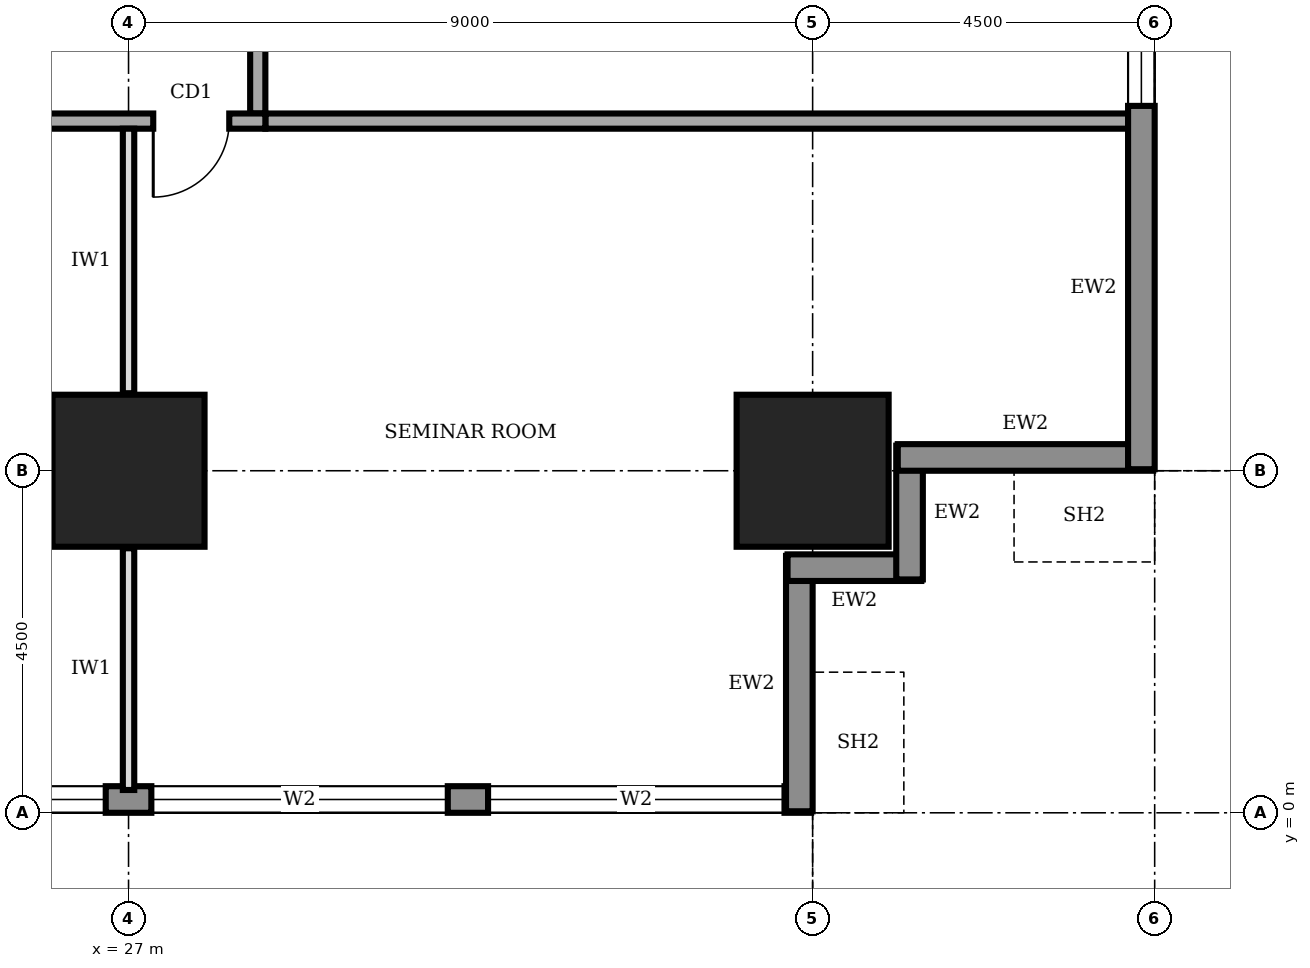
"""IFC4 building model, lengths in metres.
Left out: names, types, materials, properties, quantities, classifications, styles, units other than length and angle.
Written with IfcOpenShell. Run it as: python <this file> out.ifc"""

import sys

from ifc_helpers import new_model, si_unit, direction, frame, frame_2d, origin, origin_2d, place, context, subcontext, project, spatial, rectangle, extrude, element, fill, save


model = new_model("IFC4")
c1 = context("Model", 3, precision=1e-05, world=origin(), true_north=direction((0.0, 1.0)))
c2 = subcontext(c1, "Body", "Model", "MODEL_VIEW")
j1 = project(units=[si_unit("LENGTHUNIT", "METRE"), si_unit("PLANEANGLEUNIT", "RADIAN")], contexts=[c1])
p1 = place(None, origin())
s1 = spatial("IfcSite", under=j1, at=p1, CompositionType="ELEMENT")
p2 = place(p1, origin())
s2 = spatial("IfcBuilding", under=s1, at=p2, CompositionType="ELEMENT")
p3 = place(p2, frame((0.0, 0.0, 49.0)))
s3 = spatial("IfcBuildingStorey", under=s2, at=p3, CompositionType="ELEMENT", Elevation=49.0)
for number, where, z_axis, x_axis in (
    (1, (27.0, 4.5, 0.0), (0.0, 0.0, 1.0), (1.0, 0.0, 0.0)),
    (2, (36.0, 4.5, 0.0), (0.0, 0.0, 1.0), (1.0, 0.0, 0.0)),
):
    element("IfcColumn", number, at=place(p3, frame(where, z_axis=z_axis, x_axis=x_axis)), inside=s3, PredefinedType="COLUMN", context=c2, shape_type="SweptSolid", body=[
        extrude(rectangle(XDim=2.0, YDim=2.0, at=origin_2d()), origin(), (0.0, 0.0, 1.0), 4.0),
    ])
p4 = place(p3, frame((4.52, 0.175, 0.0), z_axis=(0.0, 0.0, 1.0), x_axis=(1.0, 0.0, 0.0)))
e3 = element("IfcWall", 3, at=p4, inside=s3, PredefinedType="STANDARD", context=c2, shape_type="SweptSolid", body=[
    extrude(rectangle(XDim=31.46, YDim=0.35, at=frame_2d((15.73, 0.0))), origin(), (0.0, 0.0, 1.0), 3.75),
])
p5 = place(p4, frame((4.78, 0.0, 0.6)))
e4 = element("IfcOpeningElement", 4, at=p5, cuts=e3, PredefinedType="OPENING", context=c2, shape_type="SweptSolid", body=[
    extrude(rectangle(XDim=3.9, YDim=2.6, at=frame_2d((1.95, 1.3))), frame((0.0, 0.185, 0.0), z_axis=(0.0, -1.0, 0.0), x_axis=(1.0, 0.0, 0.0)), (0.0, 0.0, 1.0), 0.37),
])
p6 = place(p4, frame((9.28, 0.0, 0.6)))
e5 = element("IfcOpeningElement", 5, at=p6, cuts=e3, PredefinedType="OPENING", context=c2, shape_type="SweptSolid", body=[
    extrude(rectangle(XDim=3.9, YDim=2.6, at=frame_2d((1.95, 1.3))), frame((0.0, 0.185, 0.0), z_axis=(0.0, -1.0, 0.0), x_axis=(1.0, 0.0, 0.0)), (0.0, 0.0, 1.0), 0.37),
])
p7 = place(p4, frame((13.78, 0.0, 0.6)))
e6 = element("IfcOpeningElement", 6, at=p7, cuts=e3, PredefinedType="OPENING", context=c2, shape_type="SweptSolid", body=[
    extrude(rectangle(XDim=3.9, YDim=2.6, at=frame_2d((1.95, 1.3))), frame((0.0, 0.185, 0.0), z_axis=(0.0, -1.0, 0.0), x_axis=(1.0, 0.0, 0.0)), (0.0, 0.0, 1.0), 0.37),
])
p8 = place(p4, frame((18.28, 0.0, 0.6)))
e7 = element("IfcOpeningElement", 7, at=p8, cuts=e3, PredefinedType="OPENING", context=c2, shape_type="SweptSolid", body=[
    extrude(rectangle(XDim=3.9, YDim=2.6, at=frame_2d((1.95, 1.3))), frame((0.0, 0.185, 0.0), z_axis=(0.0, -1.0, 0.0), x_axis=(1.0, 0.0, 0.0)), (0.0, 0.0, 1.0), 0.37),
])
p9 = place(p4, frame((22.78, 0.0, 0.6)))
e8 = element("IfcOpeningElement", 8, at=p9, cuts=e3, PredefinedType="OPENING", context=c2, shape_type="SweptSolid", body=[
    extrude(rectangle(XDim=3.9, YDim=2.6, at=frame_2d((1.95, 1.3))), frame((0.0, 0.185, 0.0), z_axis=(0.0, -1.0, 0.0), x_axis=(1.0, 0.0, 0.0)), (0.0, 0.0, 1.0), 0.37),
])
p10 = place(p4, frame((27.21, 0.0, 0.6)))
e9 = element("IfcOpeningElement", 9, at=p10, cuts=e3, PredefinedType="OPENING", context=c2, shape_type="SweptSolid", body=[
    extrude(rectangle(XDim=3.9, YDim=2.6, at=frame_2d((1.95, 1.3))), frame((0.0, 0.185, 0.0), z_axis=(0.0, -1.0, 0.0), x_axis=(1.0, 0.0, 0.0)), (0.0, 0.0, 1.0), 0.37),
])
p11 = place(p3, frame((35.825, 0.02, 0.0), z_axis=(0.0, 0.0, 1.0), x_axis=(0.0, 1.0, 0.0)))
e10 = element("IfcWall", 10, at=p11, inside=s3, PredefinedType="STANDARD", context=c2, shape_type="SweptSolid", body=[
    extrude(rectangle(XDim=3.36, YDim=0.35, at=frame_2d((1.68, 0.0))), origin(), (0.0, 0.0, 1.0), 2.85),
])
for number, where, z_axis, x_axis in (
    (11, (35.67, 3.225, 0.0), (0.0, 0.0, 1.0), (1.0, 0.0, 0.0)),
    (12, (37.275, 3.07, 0.0), (0.0, 0.0, 1.0), (0.0, 1.0, 0.0)),
):
    element("IfcWall", number, at=place(p3, frame(where, z_axis=z_axis, x_axis=x_axis)), inside=s3, PredefinedType="STANDARD", context=c2, shape_type="SweptSolid", body=[
        extrude(rectangle(XDim=1.76, YDim=0.35, at=frame_2d((0.88, 0.0))), origin(), (0.0, 0.0, 1.0), 3.75),
    ])
p12 = place(p3, frame((37.12, 4.675, 0.0), z_axis=(0.0, 0.0, 1.0), x_axis=(1.0, 0.0, 0.0)))
e13 = element("IfcWall", 13, at=p12, inside=s3, PredefinedType="STANDARD", context=c2, shape_type="SweptSolid", body=[
    extrude(rectangle(XDim=3.36, YDim=0.35, at=frame_2d((1.68, 0.0))), origin(), (0.0, 0.0, 1.0), 2.85),
])
p13 = place(p3, frame((40.325, 4.52, 0.0), z_axis=(0.0, 0.0, 1.0), x_axis=(0.0, 1.0, 0.0)))
e14 = element("IfcWall", 14, at=p13, inside=s3, PredefinedType="STANDARD", context=c2, shape_type="SweptSolid", body=[
    extrude(rectangle(XDim=31.46, YDim=0.35, at=frame_2d((15.73, 0.0))), origin(), (0.0, 0.0, 1.0), 3.75),
])
p14 = place(p13, frame((4.78, 0.0, 0.6)))
e15 = element("IfcOpeningElement", 15, at=p14, cuts=e14, PredefinedType="OPENING", context=c2, shape_type="SweptSolid", body=[
    extrude(rectangle(XDim=3.9, YDim=2.6, at=frame_2d((1.95, 1.3))), frame((0.0, 0.185, 0.0), z_axis=(0.0, -1.0, 0.0), x_axis=(1.0, 0.0, 0.0)), (0.0, 0.0, 1.0), 0.37),
])
p15 = place(p13, frame((9.28, 0.0, 0.6)))
e16 = element("IfcOpeningElement", 16, at=p15, cuts=e14, PredefinedType="OPENING", context=c2, shape_type="SweptSolid", body=[
    extrude(rectangle(XDim=3.9, YDim=2.6, at=frame_2d((1.95, 1.3))), frame((0.0, 0.185, 0.0), z_axis=(0.0, -1.0, 0.0), x_axis=(1.0, 0.0, 0.0)), (0.0, 0.0, 1.0), 0.37),
])
p16 = place(p13, frame((13.78, 0.0, 0.6)))
e17 = element("IfcOpeningElement", 17, at=p16, cuts=e14, PredefinedType="OPENING", context=c2, shape_type="SweptSolid", body=[
    extrude(rectangle(XDim=3.9, YDim=2.6, at=frame_2d((1.95, 1.3))), frame((0.0, 0.185, 0.0), z_axis=(0.0, -1.0, 0.0), x_axis=(1.0, 0.0, 0.0)), (0.0, 0.0, 1.0), 0.37),
])
p17 = place(p13, frame((18.28, 0.0, 0.6)))
e18 = element("IfcOpeningElement", 18, at=p17, cuts=e14, PredefinedType="OPENING", context=c2, shape_type="SweptSolid", body=[
    extrude(rectangle(XDim=3.9, YDim=2.6, at=frame_2d((1.95, 1.3))), frame((0.0, 0.185, 0.0), z_axis=(0.0, -1.0, 0.0), x_axis=(1.0, 0.0, 0.0)), (0.0, 0.0, 1.0), 0.37),
])
p18 = place(p13, frame((22.78, 0.0, 0.6)))
e19 = element("IfcOpeningElement", 19, at=p18, cuts=e14, PredefinedType="OPENING", context=c2, shape_type="SweptSolid", body=[
    extrude(rectangle(XDim=3.9, YDim=2.6, at=frame_2d((1.95, 1.3))), frame((0.0, 0.185, 0.0), z_axis=(0.0, -1.0, 0.0), x_axis=(1.0, 0.0, 0.0)), (0.0, 0.0, 1.0), 0.37),
])
p19 = place(p13, frame((27.21, 0.0, 0.6)))
e20 = element("IfcOpeningElement", 20, at=p19, cuts=e14, PredefinedType="OPENING", context=c2, shape_type="SweptSolid", body=[
    extrude(rectangle(XDim=3.9, YDim=2.6, at=frame_2d((1.95, 1.3))), frame((0.0, 0.185, 0.0), z_axis=(0.0, -1.0, 0.0), x_axis=(1.0, 0.0, 0.0)), (0.0, 0.0, 1.0), 0.37),
])
p20 = place(p3, frame((11.9, 9.1, 0.0), z_axis=(0.0, 0.0, 1.0), x_axis=(1.0, 0.0, 0.0)))
e21 = element("IfcWall", 21, at=p20, inside=s3, PredefinedType="SOLIDWALL", context=c2, shape_type="SweptSolid", body=[
    extrude(rectangle(XDim=16.9, YDim=0.2, at=frame_2d((8.45, 0.0))), origin(), (0.0, 0.0, 1.0), 3.75),
])
p21 = place(p20, frame((0.275, 0.0, 0.0)))
e22 = element("IfcOpeningElement", 22, at=p21, cuts=e21, PredefinedType="OPENING", context=c2, shape_type="SweptSolid", body=[
    extrude(rectangle(XDim=1.0, YDim=2.1, at=frame_2d((0.5, 1.05))), frame((0.0, 0.11, 0.0), z_axis=(0.0, -1.0, 0.0), x_axis=(1.0, 0.0, 0.0)), (0.0, 0.0, 1.0), 0.22),
])
p22 = place(p20, frame((7.45, 0.0, 0.0)))
e23 = element("IfcOpeningElement", 23, at=p22, cuts=e21, PredefinedType="OPENING", context=c2, shape_type="SweptSolid", body=[
    extrude(rectangle(XDim=1.8, YDim=2.1, at=frame_2d((0.9, 1.05))), frame((0.0, 0.11, 0.0), z_axis=(0.0, -1.0, 0.0), x_axis=(1.0, 0.0, 0.0)), (0.0, 0.0, 1.0), 0.22),
])
p23 = place(p20, frame((15.425, 0.0, 0.0)))
e24 = element("IfcOpeningElement", 24, at=p23, cuts=e21, PredefinedType="OPENING", context=c2, shape_type="SweptSolid", body=[
    extrude(rectangle(XDim=1.0, YDim=2.1, at=frame_2d((0.5, 1.05))), frame((0.0, 0.11, 0.0), z_axis=(0.0, -1.0, 0.0), x_axis=(1.0, 0.0, 0.0)), (0.0, 0.0, 1.0), 0.22),
])
p24 = place(p3, frame((28.7, 9.2, 0.0), z_axis=(0.0, 0.0, 1.0), x_axis=(0.0, 1.0, 0.0)))
e25 = element("IfcWall", 25, at=p24, inside=s3, PredefinedType="SOLIDWALL", context=c2, shape_type="SweptSolid", body=[
    extrude(rectangle(XDim=23.8, YDim=0.2, at=frame_2d((11.9, 0.0))), origin(), (0.0, 0.0, 1.0), 3.75),
])
p25 = place(p24, frame((3.4, 0.0, 0.0)))
e26 = element("IfcOpeningElement", 26, at=p25, cuts=e25, PredefinedType="OPENING", context=c2, shape_type="SweptSolid", body=[
    extrude(rectangle(XDim=1.8, YDim=2.1, at=frame_2d((0.9, 1.05))), frame((0.0, 0.11, 0.0), z_axis=(0.0, -1.0, 0.0), x_axis=(1.0, 0.0, 0.0)), (0.0, 0.0, 1.0), 0.22),
])
p26 = place(p24, frame((10.55, 0.0, 0.0)))
e27 = element("IfcOpeningElement", 27, at=p26, cuts=e25, PredefinedType="OPENING", context=c2, shape_type="SweptSolid", body=[
    extrude(rectangle(XDim=1.0, YDim=2.1, at=frame_2d((0.5, 1.05))), frame((0.0, 0.11, 0.0), z_axis=(0.0, -1.0, 0.0), x_axis=(1.0, 0.0, 0.0)), (0.0, 0.0, 1.0), 0.22),
])
p27 = place(p24, frame((17.65, 0.0, 0.0)))
e28 = element("IfcOpeningElement", 28, at=p27, cuts=e25, PredefinedType="OPENING", context=c2, shape_type="SweptSolid", body=[
    extrude(rectangle(XDim=1.8, YDim=2.1, at=frame_2d((0.9, 1.05))), frame((0.0, 0.11, 0.0), z_axis=(0.0, -1.0, 0.0), x_axis=(1.0, 0.0, 0.0)), (0.0, 0.0, 1.0), 0.22),
])
p28 = place(p3, frame((28.8, 9.1, 0.0), z_axis=(0.0, 0.0, 1.0), x_axis=(1.0, 0.0, 0.0)))
e29 = element("IfcWall", 29, at=p28, inside=s3, PredefinedType="SOLIDWALL", context=c2, shape_type="SweptSolid", body=[
    extrude(rectangle(XDim=11.4, YDim=0.2, at=frame_2d((5.7, 0.0))), origin(), (0.0, 0.0, 1.0), 3.75),
])
p29 = place(p3, frame((27.0, 0.3, 0.0), z_axis=(0.0, 0.0, 1.0), x_axis=(0.0, 1.0, 0.0)))
e30 = element("IfcWall", 30, at=p29, inside=s3, PredefinedType="PARTITIONING", context=c2, shape_type="SweptSolid", body=[
    extrude(rectangle(XDim=3.18, YDim=0.15, at=frame_2d((1.59, 0.0))), origin(), (0.0, 0.0, 1.0), 2.85),
])
p30 = place(p3, frame((27.0, 5.52, 0.0), z_axis=(0.0, 0.0, 1.0), x_axis=(0.0, 1.0, 0.0)))
e31 = element("IfcWall", 31, at=p30, inside=s3, PredefinedType="PARTITIONING", context=c2, shape_type="SweptSolid", body=[
    extrude(rectangle(XDim=3.48, YDim=0.15, at=frame_2d((1.74, 0.0))), origin(), (0.0, 0.0, 1.0), 2.85),
])
p31 = place(p8, origin())
e32 = element("IfcWindow", 32, at=p31, inside=s3, PartitioningType="SINGLE_PANEL", PredefinedType="WINDOW", context=c2, shape_type="SweptSolid", body=[
    extrude(rectangle(XDim=3.9, YDim=2.6, at=frame_2d((1.95, 1.3))), frame((0.0, 0.03, 0.0), z_axis=(0.0, -1.0, 0.0), x_axis=(1.0, 0.0, 0.0)), (0.0, 0.0, 1.0), 0.06),
])
fill(e7, e32)
p32 = place(p9, origin())
e33 = element("IfcWindow", 33, at=p32, inside=s3, PartitioningType="SINGLE_PANEL", PredefinedType="WINDOW", context=c2, shape_type="SweptSolid", body=[
    extrude(rectangle(XDim=3.9, YDim=2.6, at=frame_2d((1.95, 1.3))), frame((0.0, 0.03, 0.0), z_axis=(0.0, -1.0, 0.0), x_axis=(1.0, 0.0, 0.0)), (0.0, 0.0, 1.0), 0.06),
])
fill(e8, e33)
p33 = place(p10, origin())
e34 = element("IfcWindow", 34, at=p33, inside=s3, PartitioningType="SINGLE_PANEL", PredefinedType="WINDOW", context=c2, shape_type="SweptSolid", body=[
    extrude(rectangle(XDim=3.9, YDim=2.6, at=frame_2d((1.95, 1.3))), frame((0.0, 0.03, 0.0), z_axis=(0.0, -1.0, 0.0), x_axis=(1.0, 0.0, 0.0)), (0.0, 0.0, 1.0), 0.06),
])
fill(e9, e34)
p34 = place(p14, origin())
e35 = element("IfcWindow", 35, at=p34, inside=s3, PartitioningType="SINGLE_PANEL", PredefinedType="WINDOW", context=c2, shape_type="SweptSolid", body=[
    extrude(rectangle(XDim=3.9, YDim=2.6, at=frame_2d((1.95, 1.3))), frame((0.0, 0.03, 0.0), z_axis=(0.0, -1.0, 0.0), x_axis=(1.0, 0.0, 0.0)), (0.0, 0.0, 1.0), 0.06),
])
fill(e15, e35)
p35 = place(p23, frame((1.0, 0.0, 0.0), z_axis=(0.0, 0.0, 1.0), x_axis=(-1.0, 0.0, 0.0)))
e36 = element("IfcDoor", 36, at=p35, inside=s3, OperationType="SINGLE_SWING_RIGHT", PredefinedType="DOOR", context=c2, shape_type="SweptSolid", body=[
    extrude(rectangle(XDim=1.0, YDim=2.1, at=frame_2d((0.5, 1.05))), frame((0.0, 0.025, 0.0), z_axis=(0.0, -1.0, 0.0), x_axis=(1.0, 0.0, 0.0)), (0.0, 0.0, 1.0), 0.05),
])
fill(e24, e36)
save(model, sys.argv[1])
